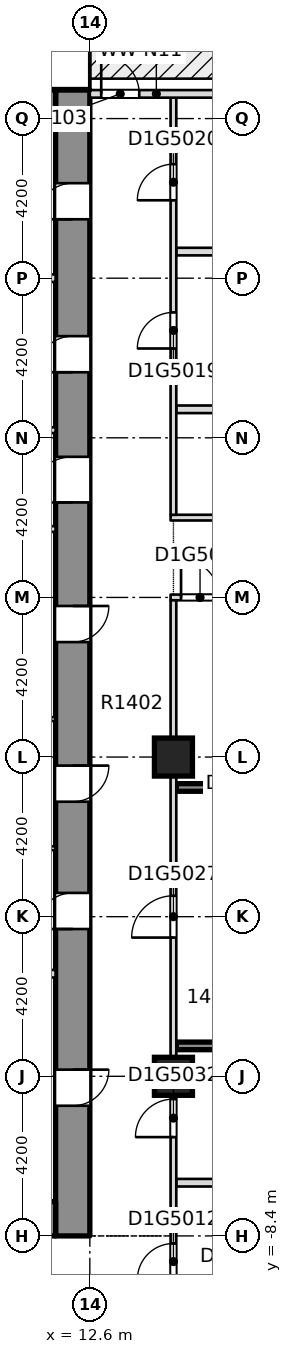
"""IFC4 building model, lengths in metres.
Left out: names, types, materials, properties, quantities, classifications, styles, units other than length and angle.
Written with IfcOpenShell. Run it as: python <this file> out.ifc"""

import sys

from ifc_helpers import new_model, si_unit, direction, frame, frame_2d, origin, origin_2d, place, context, subcontext, project, spatial, rectangle, extrude, element, fill, save


model = new_model("IFC4")
c1 = context("Model", 3, precision=1e-05, world=origin(), true_north=direction((0.0, 1.0)))
c2 = subcontext(c1, "Body", "Model", "MODEL_VIEW")
j1 = project(units=[si_unit("LENGTHUNIT", "METRE"), si_unit("PLANEANGLEUNIT", "RADIAN")], contexts=[c1])
p1 = place(None, origin())
s1 = spatial("IfcSite", under=j1, at=p1, CompositionType="ELEMENT")
p2 = place(p1, origin())
s2 = spatial("IfcBuilding", under=s1, at=p2, CompositionType="ELEMENT")
p3 = place(p2, frame((0.0, 0.0, 62.1)))
s3 = spatial("IfcBuildingStorey", under=s2, at=p3, CompositionType="ELEMENT", Elevation=62.1)
p4 = place(p3, frame((12.15, -8.4, -0.32), z_axis=(0.0, 0.0, 1.0), x_axis=(0.0, 1.0, 0.0)))
e1 = element("IfcWall", 1, at=p4, inside=s3, PredefinedType="SHEAR", context=c2, shape_type="SweptSolid", body=[
    extrude(rectangle(XDim=30.15, YDim=0.9, at=frame_2d((15.075, 0.0))), origin(), (0.0, 0.0, 1.0), 3.45),
])
p5 = place(p4, frame((3.425, 0.0, 0.32)))
e2 = element("IfcOpeningElement", 2, at=p5, cuts=e1, PredefinedType="OPENING", context=c2, shape_type="SweptSolid", body=[
    extrude(rectangle(XDim=0.95, YDim=2.1, at=frame_2d((0.475, 1.05))), frame((0.0, 0.46, 0.0), z_axis=(0.0, -1.0, 0.0), x_axis=(1.0, 0.0, 0.0)), (0.0, 0.0, 1.0), 0.92),
])
p6 = place(p4, frame((8.075, 0.0, 0.32)))
e3 = element("IfcOpeningElement", 3, at=p6, cuts=e1, PredefinedType="OPENING", context=c2, shape_type="SweptSolid", body=[
    extrude(rectangle(XDim=0.95, YDim=2.1, at=frame_2d((0.475, 1.05))), frame((0.0, 0.46, 0.0), z_axis=(0.0, -1.0, 0.0), x_axis=(1.0, 0.0, 0.0)), (0.0, 0.0, 1.0), 0.92),
])
p7 = place(p4, frame((11.425, 0.0, 0.32)))
e4 = element("IfcOpeningElement", 4, at=p7, cuts=e1, PredefinedType="OPENING", context=c2, shape_type="SweptSolid", body=[
    extrude(rectangle(XDim=0.95, YDim=2.1, at=frame_2d((0.475, 1.05))), frame((0.0, 0.46, 0.0), z_axis=(0.0, -1.0, 0.0), x_axis=(1.0, 0.0, 0.0)), (0.0, 0.0, 1.0), 0.92),
])
p8 = place(p4, frame((15.625, 0.0, 0.32)))
e5 = element("IfcOpeningElement", 5, at=p8, cuts=e1, PredefinedType="OPENING", context=c2, shape_type="SweptSolid", body=[
    extrude(rectangle(XDim=0.95, YDim=2.1, at=frame_2d((0.475, 1.05))), frame((0.0, 0.46, 0.0), z_axis=(0.0, -1.0, 0.0), x_axis=(1.0, 0.0, 0.0)), (0.0, 0.0, 1.0), 0.92),
])
p9 = place(p4, frame((22.725, 0.0, 0.32)))
e6 = element("IfcOpeningElement", 6, at=p9, cuts=e1, PredefinedType="OPENING", context=c2, shape_type="SweptSolid", body=[
    extrude(rectangle(XDim=0.95, YDim=2.1, at=frame_2d((0.475, 1.05))), frame((0.0, 0.46, 0.0), z_axis=(0.0, -1.0, 0.0), x_axis=(1.0, 0.0, 0.0)), (0.0, 0.0, 1.0), 0.92),
])
p10 = place(p4, frame((26.75, 0.0, 0.32)))
e7 = element("IfcOpeningElement", 7, at=p10, cuts=e1, PredefinedType="OPENING", context=c2, shape_type="SweptSolid", body=[
    extrude(rectangle(XDim=0.95, YDim=2.1, at=frame_2d((0.475, 1.05))), frame((0.0, 0.46, 0.0), z_axis=(0.0, -1.0, 0.0), x_axis=(1.0, 0.0, 0.0)), (0.0, 0.0, 1.0), 0.92),
])
p11 = place(p4, frame((19.3, 0.0, 0.32)))
e8 = element("IfcOpeningElement", 8, at=p11, cuts=e1, PredefinedType="OPENING", context=c2, shape_type="SweptSolid", body=[
    extrude(rectangle(XDim=1.2, YDim=2.1, at=frame_2d((0.6, 1.05))), frame((0.0, 0.46, 0.0), z_axis=(0.0, -1.0, 0.0), x_axis=(1.0, 0.0, 0.0)), (0.0, 0.0, 1.0), 0.92),
])
p12 = place(p3, frame((-11.7, -7.95, -0.32), z_axis=(0.0, 0.0, 1.0), x_axis=(1.0, 0.0, 0.0)))
e9 = element("IfcWall", 9, at=p12, inside=s3, PredefinedType="SHEAR", context=c2, shape_type="SweptSolid", body=[
    extrude(rectangle(XDim=23.4, YDim=0.9, at=frame_2d((11.7, 0.0))), origin(), (0.0, 0.0, 1.0), 3.45),
])
p13 = place(p12, frame((6.95, 0.0, 0.32)))
e10 = element("IfcOpeningElement", 10, at=p13, cuts=e9, PredefinedType="OPENING", context=c2, shape_type="SweptSolid", body=[
    extrude(rectangle(XDim=1.8, YDim=2.1, at=frame_2d((0.9, 1.05))), frame((0.0, 0.46, 0.0), z_axis=(0.0, -1.0, 0.0), x_axis=(1.0, 0.0, 0.0)), (0.0, 0.0, 1.0), 0.92),
])
p14 = place(p12, frame((14.65, 0.0, 0.32)))
e11 = element("IfcOpeningElement", 11, at=p14, cuts=e9, PredefinedType="OPENING", context=c2, shape_type="SweptSolid", body=[
    extrude(rectangle(XDim=1.8, YDim=2.1, at=frame_2d((0.9, 1.05))), frame((0.0, 0.46, 0.0), z_axis=(0.0, -1.0, 0.0), x_axis=(1.0, 0.0, 0.0)), (0.0, 0.0, 1.0), 0.92),
])
p15 = place(p3, frame((-11.7, 21.3, -0.32), z_axis=(0.0, 0.0, 1.0), x_axis=(1.0, 0.0, 0.0)))
e12 = element("IfcWall", 12, at=p15, inside=s3, PredefinedType="SOLIDWALL", context=c2, shape_type="SweptSolid", body=[
    extrude(rectangle(XDim=23.4, YDim=0.9, at=frame_2d((11.7, 0.0))), origin(), (0.0, 0.0, 1.0), 3.45),
])
for number, where, z_axis, x_axis in (
    (13, (14.8, -4.2, -0.32), (0.0, 0.0, 1.0), (1.0, 0.0, 0.0)),
    (14, (14.8, 4.2, -0.32), (0.0, 0.0, 1.0), (1.0, 0.0, 0.0)),
):
    element("IfcColumn", number, at=place(p3, frame(where, z_axis=z_axis, x_axis=x_axis)), inside=s3, PredefinedType="COLUMN", context=c2, shape_type="SweptSolid", body=[
        extrude(rectangle(XDim=1.0, YDim=1.0, at=origin_2d()), origin(), (0.0, 0.0, 1.0), 3.45),
    ])
p16 = place(p3, frame((14.875, -7.0, 0.0), z_axis=(0.0, 0.0, 1.0), x_axis=(1.0, 0.0, 0.0)))
e15 = element("IfcWall", 15, at=p16, inside=s3, PredefinedType="PARTITIONING", context=c2, shape_type="SweptSolid", body=[
    extrude(rectangle(XDim=10.875, YDim=0.2, at=frame_2d((5.438, 0.0))), origin(), (0.0, 0.0, 1.0), 3.13),
])
p17 = place(p3, frame((14.875, -3.4, 0.0), z_axis=(0.0, 0.0, 1.0), x_axis=(1.0, 0.0, 0.0)))
e16 = element("IfcWall", 16, at=p17, inside=s3, PredefinedType="SOLIDWALL", context=c2, shape_type="SweptSolid", body=[
    extrude(rectangle(XDim=8.725, YDim=0.2, at=frame_2d((4.363, 0.0))), origin(), (0.0, 0.0, 1.0), 3.13),
])
p18 = place(p3, frame((14.875, 3.4, 0.0), z_axis=(0.0, 0.0, 1.0), x_axis=(1.0, 0.0, 0.0)))
e17 = element("IfcWall", 17, at=p18, inside=s3, PredefinedType="SOLIDWALL", context=c2, shape_type="SweptSolid", body=[
    extrude(rectangle(XDim=5.575, YDim=0.2, at=frame_2d((2.788, 0.0))), origin(), (0.0, 0.0, 1.0), 3.13),
])
p19 = place(p3, frame((14.725, 8.4, 0.0), z_axis=(0.0, 0.0, 1.0), x_axis=(1.0, 0.0, 0.0)))
e18 = element("IfcWall", 18, at=p19, inside=s3, PredefinedType="PARTITIONING", context=c2, shape_type="SweptSolid", body=[
    extrude(rectangle(XDim=11.025, YDim=0.15, at=frame_2d((5.512, 0.0))), origin(), (0.0, 0.0, 1.0), 3.13),
])
p20 = place(p19, frame((0.275, 0.0, 0.0)))
e19 = element("IfcOpeningElement", 19, at=p20, cuts=e18, PredefinedType="OPENING", context=c2, shape_type="SweptSolid", body=[
    extrude(rectangle(XDim=1.0, YDim=2.1, at=frame_2d((0.5, 1.05))), frame((0.0, 0.085, 0.0), z_axis=(0.0, -1.0, 0.0), x_axis=(1.0, 0.0, 0.0)), (0.0, 0.0, 1.0), 0.17),
])
p21 = place(p3, frame((14.725, 10.5, 0.0), z_axis=(0.0, 0.0, 1.0), x_axis=(1.0, 0.0, 0.0)))
e20 = element("IfcWall", 20, at=p21, inside=s3, PredefinedType="PARTITIONING", context=c2, shape_type="SweptSolid", body=[
    extrude(rectangle(XDim=11.025, YDim=0.15, at=frame_2d((5.512, 0.0))), origin(), (0.0, 0.0, 1.0), 3.13),
])
p22 = place(p21, frame((5.15, 0.0, 0.0)))
e21 = element("IfcOpeningElement", 21, at=p22, cuts=e20, PredefinedType="OPENING", context=c2, shape_type="SweptSolid", body=[
    extrude(rectangle(XDim=1.0, YDim=2.1, at=frame_2d((0.5, 1.05))), frame((0.0, 0.085, 0.0), z_axis=(0.0, -1.0, 0.0), x_axis=(1.0, 0.0, 0.0)), (0.0, 0.0, 1.0), 0.17),
])
for number, where, z_axis, x_axis in (
    (22, (14.875, 13.35, 0.0), (0.0, 0.0, 1.0), (1.0, 0.0, 0.0)),
    (23, (14.875, 17.5, 0.0), (0.0, 0.0, 1.0), (1.0, 0.0, 0.0)),
):
    element("IfcWall", number, at=place(p3, frame(where, z_axis=z_axis, x_axis=x_axis)), inside=s3, PredefinedType="PARTITIONING", context=c2, shape_type="SweptSolid", body=[
        extrude(rectangle(XDim=2.475, YDim=0.2, at=frame_2d((1.238, 0.0))), origin(), (0.0, 0.0, 1.0), 3.13),
    ])
p23 = place(p3, frame((14.8, -9.85, 0.0), z_axis=(0.0, 0.0, 1.0), x_axis=(0.0, 1.0, 0.0)))
e24 = element("IfcWall", 24, at=p23, inside=s3, PredefinedType="PARTITIONING", context=c2, shape_type="SweptSolid", body=[
    extrude(rectangle(XDim=18.175, YDim=0.15, at=frame_2d((9.087, 0.0))), origin(), (0.0, 0.0, 1.0), 3.13),
])
p24 = place(p23, frame((0.3, 0.0, 0.0)))
e25 = element("IfcOpeningElement", 25, at=p24, cuts=e24, PredefinedType="OPENING", context=c2, shape_type="SweptSolid", body=[
    extrude(rectangle(XDim=0.95, YDim=2.1, at=frame_2d((0.475, 1.05))), frame((0.0, 0.085, 0.0), z_axis=(0.0, -1.0, 0.0), x_axis=(1.0, 0.0, 0.0)), (0.0, 0.0, 1.0), 0.17),
])
p25 = place(p23, frame((9.3, 0.0, 0.0)))
e26 = element("IfcOpeningElement", 26, at=p25, cuts=e24, PredefinedType="OPENING", context=c2, shape_type="SweptSolid", body=[
    extrude(rectangle(XDim=1.1, YDim=2.1, at=frame_2d((0.55, 1.05))), frame((0.0, 0.085, 0.0), z_axis=(0.0, -1.0, 0.0), x_axis=(1.0, 0.0, 0.0)), (0.0, 0.0, 1.0), 0.17),
])
p26 = place(p23, frame((4.05, 0.0, 0.0)))
e27 = element("IfcOpeningElement", 27, at=p26, cuts=e24, PredefinedType="OPENING", context=c2, shape_type="SweptSolid", body=[
    extrude(rectangle(XDim=1.0, YDim=2.1, at=frame_2d((0.5, 1.05))), frame((0.0, 0.085, 0.0), z_axis=(0.0, -1.0, 0.0), x_axis=(1.0, 0.0, 0.0)), (0.0, 0.0, 1.0), 0.17),
])
p27 = place(p3, frame((14.8, 10.575, 0.0), z_axis=(0.0, 0.0, 1.0), x_axis=(0.0, 1.0, 0.0)))
e28 = element("IfcWall", 28, at=p27, inside=s3, PredefinedType="PARTITIONING", context=c2, shape_type="SweptSolid", body=[
    extrude(rectangle(XDim=10.975, YDim=0.15, at=frame_2d((5.488, 0.0))), origin(), (0.0, 0.0, 1.0), 3.13),
])
p28 = place(p27, frame((4.375, 0.0, 0.0)))
e29 = element("IfcOpeningElement", 29, at=p28, cuts=e28, PredefinedType="OPENING", context=c2, shape_type="SweptSolid", body=[
    extrude(rectangle(XDim=0.95, YDim=2.1, at=frame_2d((0.475, 1.05))), frame((0.0, 0.085, 0.0), z_axis=(0.0, -1.0, 0.0), x_axis=(1.0, 0.0, 0.0)), (0.0, 0.0, 1.0), 0.17),
])
p29 = place(p27, frame((8.275, 0.0, 0.0)))
e30 = element("IfcOpeningElement", 30, at=p29, cuts=e28, PredefinedType="OPENING", context=c2, shape_type="SweptSolid", body=[
    extrude(rectangle(XDim=0.95, YDim=2.1, at=frame_2d((0.475, 1.05))), frame((0.0, 0.085, 0.0), z_axis=(0.0, -1.0, 0.0), x_axis=(1.0, 0.0, 0.0)), (0.0, 0.0, 1.0), 0.17),
])
p30 = place(p3, frame((16.1, 21.65, 0.0), z_axis=(0.0, 0.0, 1.0), x_axis=(-1.0, 0.0, 0.0)))
e31 = element("IfcWall", 31, at=p30, inside=s3, PredefinedType="STANDARD", context=c2, shape_type="SweptSolid", body=[
    extrude(rectangle(XDim=3.5, YDim=0.2, at=frame_2d((1.75, 0.0))), origin(), (0.0, 0.0, 1.0), 3.13),
])
p31 = place(p30, frame((2.2, 0.0, 0.0)))
e32 = element("IfcOpeningElement", 32, at=p31, cuts=e31, PredefinedType="OPENING", context=c2, shape_type="SweptSolid", body=[
    extrude(rectangle(XDim=1.0, YDim=2.4, at=frame_2d((0.5, 1.2))), frame((0.0, 0.11, 0.0), z_axis=(0.0, -1.0, 0.0), x_axis=(1.0, 0.0, 0.0)), (0.0, 0.0, 1.0), 0.22),
])
p32 = place(p3, frame((8.851, -1.5, 0.0), z_axis=(0.0, 0.0, 1.0), x_axis=(1.0, 0.0, 0.0)))
e33 = element("IfcWall", 33, at=p32, inside=s3, PredefinedType="PARTITIONING", context=c2, shape_type="SweptSolid", body=[
    extrude(rectangle(XDim=2.848, YDim=0.2, at=frame_2d((1.424, 0.0))), origin(), (0.0, 0.0, 1.0), 3.13),
])
for number, where, z_axis, x_axis in (
    (34, (8.851, 1.8, 0.0), (0.0, 0.0, 1.0), (1.0, 0.0, 0.0)),
    (35, (8.851, 5.2, 0.0), (0.0, 0.0, 1.0), (1.0, 0.0, 0.0)),
):
    element("IfcWall", number, at=place(p3, frame(where, z_axis=z_axis, x_axis=x_axis)), inside=s3, PredefinedType="PARTITIONING", context=c2, shape_type="SweptSolid", body=[
        extrude(rectangle(XDim=2.848, YDim=0.1, at=frame_2d((1.424, 0.0))), origin(), (0.0, 0.0, 1.0), 3.13),
    ])
for number, where, z_axis, x_axis in (
    (36, (8.851, 10.2, 0.0), (0.0, 0.0, 1.0), (1.0, 0.0, 0.0)),
    (37, (8.851, 12.8, 0.0), (0.0, 0.0, 1.0), (1.0, 0.0, 0.0)),
):
    element("IfcWall", number, at=place(p3, frame(where, z_axis=z_axis, x_axis=x_axis)), inside=s3, PredefinedType="PARTITIONING", context=c2, shape_type="SweptSolid", body=[
        extrude(rectangle(XDim=2.848, YDim=0.15, at=frame_2d((1.424, 0.0))), origin(), (0.0, 0.0, 1.0), 3.13),
    ])
p33 = place(p3, frame((8.851, 16.8, 0.0), z_axis=(0.0, 0.0, 1.0), x_axis=(1.0, 0.0, 0.0)))
e38 = element("IfcWall", 38, at=p33, inside=s3, PredefinedType="PARTITIONING", context=c2, shape_type="SweptSolid", body=[
    extrude(rectangle(XDim=2.848, YDim=0.2, at=frame_2d((1.424, 0.0))), origin(), (0.0, 0.0, 1.0), 3.13),
])
p34 = place(p24, origin())
e39 = element("IfcDoor", 39, at=p34, inside=s3, OperationType="SINGLE_SWING_RIGHT", PredefinedType="DOOR", context=c2, shape_type="SweptSolid", body=[
    extrude(rectangle(XDim=0.95, YDim=2.1, at=frame_2d((0.475, 1.05))), frame((0.0, 0.025, 0.0), z_axis=(0.0, -1.0, 0.0), x_axis=(1.0, 0.0, 0.0)), (0.0, 0.0, 1.0), 0.05),
])
fill(e25, e39)
p35 = place(p20, origin())
e40 = element("IfcDoor", 40, at=p35, inside=s3, OperationType="SINGLE_SWING_RIGHT", PredefinedType="DOOR", context=c2, shape_type="SweptSolid", body=[
    extrude(rectangle(XDim=1.0, YDim=2.1, at=frame_2d((0.5, 1.05))), frame((0.0, 0.025, 0.0), z_axis=(0.0, -1.0, 0.0), x_axis=(1.0, 0.0, 0.0)), (0.0, 0.0, 1.0), 0.05),
])
fill(e19, e40)
p36 = place(p28, origin())
e41 = element("IfcDoor", 41, at=p36, inside=s3, OperationType="SINGLE_SWING_RIGHT", PredefinedType="DOOR", context=c2, shape_type="SweptSolid", body=[
    extrude(rectangle(XDim=0.95, YDim=2.1, at=frame_2d((0.475, 1.05))), frame((0.0, 0.025, 0.0), z_axis=(0.0, -1.0, 0.0), x_axis=(1.0, 0.0, 0.0)), (0.0, 0.0, 1.0), 0.05),
])
fill(e29, e41)
p37 = place(p29, origin())
e42 = element("IfcDoor", 42, at=p37, inside=s3, OperationType="SINGLE_SWING_LEFT", PredefinedType="DOOR", context=c2, shape_type="SweptSolid", body=[
    extrude(rectangle(XDim=0.95, YDim=2.1, at=frame_2d((0.475, 1.05))), frame((0.0, 0.025, 0.0), z_axis=(0.0, -1.0, 0.0), x_axis=(1.0, 0.0, 0.0)), (0.0, 0.0, 1.0), 0.05),
])
fill(e30, e42)
p38 = place(p25, origin())
e43 = element("IfcDoor", 43, at=p38, inside=s3, OperationType="SINGLE_SWING_LEFT", PredefinedType="DOOR", context=c2, shape_type="SweptSolid", body=[
    extrude(rectangle(XDim=1.1, YDim=2.1, at=frame_2d((0.55, 1.05))), frame((0.0, 0.025, 0.0), z_axis=(0.0, -1.0, 0.0), x_axis=(1.0, 0.0, 0.0)), (0.0, 0.0, 1.0), 0.05),
])
fill(e26, e43)
p39 = place(p26, origin())
e44 = element("IfcDoor", 44, at=p39, inside=s3, OperationType="SINGLE_SWING_RIGHT", PredefinedType="DOOR", context=c2, shape_type="SweptSolid", body=[
    extrude(rectangle(XDim=1.0, YDim=2.1, at=frame_2d((0.5, 1.05))), frame((0.0, 0.025, 0.0), z_axis=(0.0, -1.0, 0.0), x_axis=(1.0, 0.0, 0.0)), (0.0, 0.0, 1.0), 0.05),
])
fill(e27, e44)
p40 = place(p31, origin())
e45 = element("IfcDoor", 45, at=p40, inside=s3, OperationType="SINGLE_SWING_LEFT", PredefinedType="DOOR", context=c2, shape_type="SweptSolid", body=[
    extrude(rectangle(XDim=1.0, YDim=2.4, at=frame_2d((0.5, 1.2))), frame((0.0, 0.025, 0.0), z_axis=(0.0, -1.0, 0.0), x_axis=(1.0, 0.0, 0.0)), (0.0, 0.0, 1.0), 0.05),
])
fill(e32, e45)
p41 = place(p5, origin())
e46 = element("IfcDoor", 46, at=p41, inside=s3, OperationType="SINGLE_SWING_LEFT", PredefinedType="DOOR", context=c2, shape_type="SweptSolid", body=[
    extrude(rectangle(XDim=0.95, YDim=2.1, at=frame_2d((0.475, 1.05))), frame((0.0, 0.025, 0.0), z_axis=(0.0, -1.0, 0.0), x_axis=(1.0, 0.0, 0.0)), (0.0, 0.0, 1.0), 0.05),
])
fill(e2, e46)
p42 = place(p6, origin())
e47 = element("IfcDoor", 47, at=p42, inside=s3, OperationType="SINGLE_SWING_LEFT", PredefinedType="DOOR", context=c2, shape_type="SweptSolid", body=[
    extrude(rectangle(XDim=0.95, YDim=2.1, at=frame_2d((0.475, 1.05))), frame((0.0, 0.025, 0.0), z_axis=(0.0, -1.0, 0.0), x_axis=(1.0, 0.0, 0.0)), (0.0, 0.0, 1.0), 0.05),
])
fill(e3, e47)
p43 = place(p7, origin())
e48 = element("IfcDoor", 48, at=p43, inside=s3, OperationType="SINGLE_SWING_LEFT", PredefinedType="DOOR", context=c2, shape_type="SweptSolid", body=[
    extrude(rectangle(XDim=0.95, YDim=2.1, at=frame_2d((0.475, 1.05))), frame((0.0, 0.025, 0.0), z_axis=(0.0, -1.0, 0.0), x_axis=(1.0, 0.0, 0.0)), (0.0, 0.0, 1.0), 0.05),
])
fill(e4, e48)
p44 = place(p8, origin())
e49 = element("IfcDoor", 49, at=p44, inside=s3, OperationType="SINGLE_SWING_LEFT", PredefinedType="DOOR", context=c2, shape_type="SweptSolid", body=[
    extrude(rectangle(XDim=0.95, YDim=2.1, at=frame_2d((0.475, 1.05))), frame((0.0, 0.025, 0.0), z_axis=(0.0, -1.0, 0.0), x_axis=(1.0, 0.0, 0.0)), (0.0, 0.0, 1.0), 0.05),
])
fill(e5, e49)
p45 = place(p9, origin())
e50 = element("IfcDoor", 50, at=p45, inside=s3, OperationType="SINGLE_SWING_LEFT", PredefinedType="DOOR", context=c2, shape_type="SweptSolid", body=[
    extrude(rectangle(XDim=0.95, YDim=2.1, at=frame_2d((0.475, 1.05))), frame((0.0, 0.025, 0.0), z_axis=(0.0, -1.0, 0.0), x_axis=(1.0, 0.0, 0.0)), (0.0, 0.0, 1.0), 0.05),
])
fill(e6, e50)
p46 = place(p10, origin())
e51 = element("IfcDoor", 51, at=p46, inside=s3, OperationType="SINGLE_SWING_LEFT", PredefinedType="DOOR", context=c2, shape_type="SweptSolid", body=[
    extrude(rectangle(XDim=0.95, YDim=2.1, at=frame_2d((0.475, 1.05))), frame((0.0, 0.025, 0.0), z_axis=(0.0, -1.0, 0.0), x_axis=(1.0, 0.0, 0.0)), (0.0, 0.0, 1.0), 0.05),
])
fill(e7, e51)
p47 = place(p11, origin())
e52 = element("IfcDoor", 52, at=p47, inside=s3, OperationType="SINGLE_SWING_LEFT", PredefinedType="DOOR", context=c2, shape_type="SweptSolid", body=[
    extrude(rectangle(XDim=1.2, YDim=2.1, at=frame_2d((0.6, 1.05))), frame((0.0, 0.025, 0.0), z_axis=(0.0, -1.0, 0.0), x_axis=(1.0, 0.0, 0.0)), (0.0, 0.0, 1.0), 0.05),
])
fill(e8, e52)
save(model, sys.argv[1])
